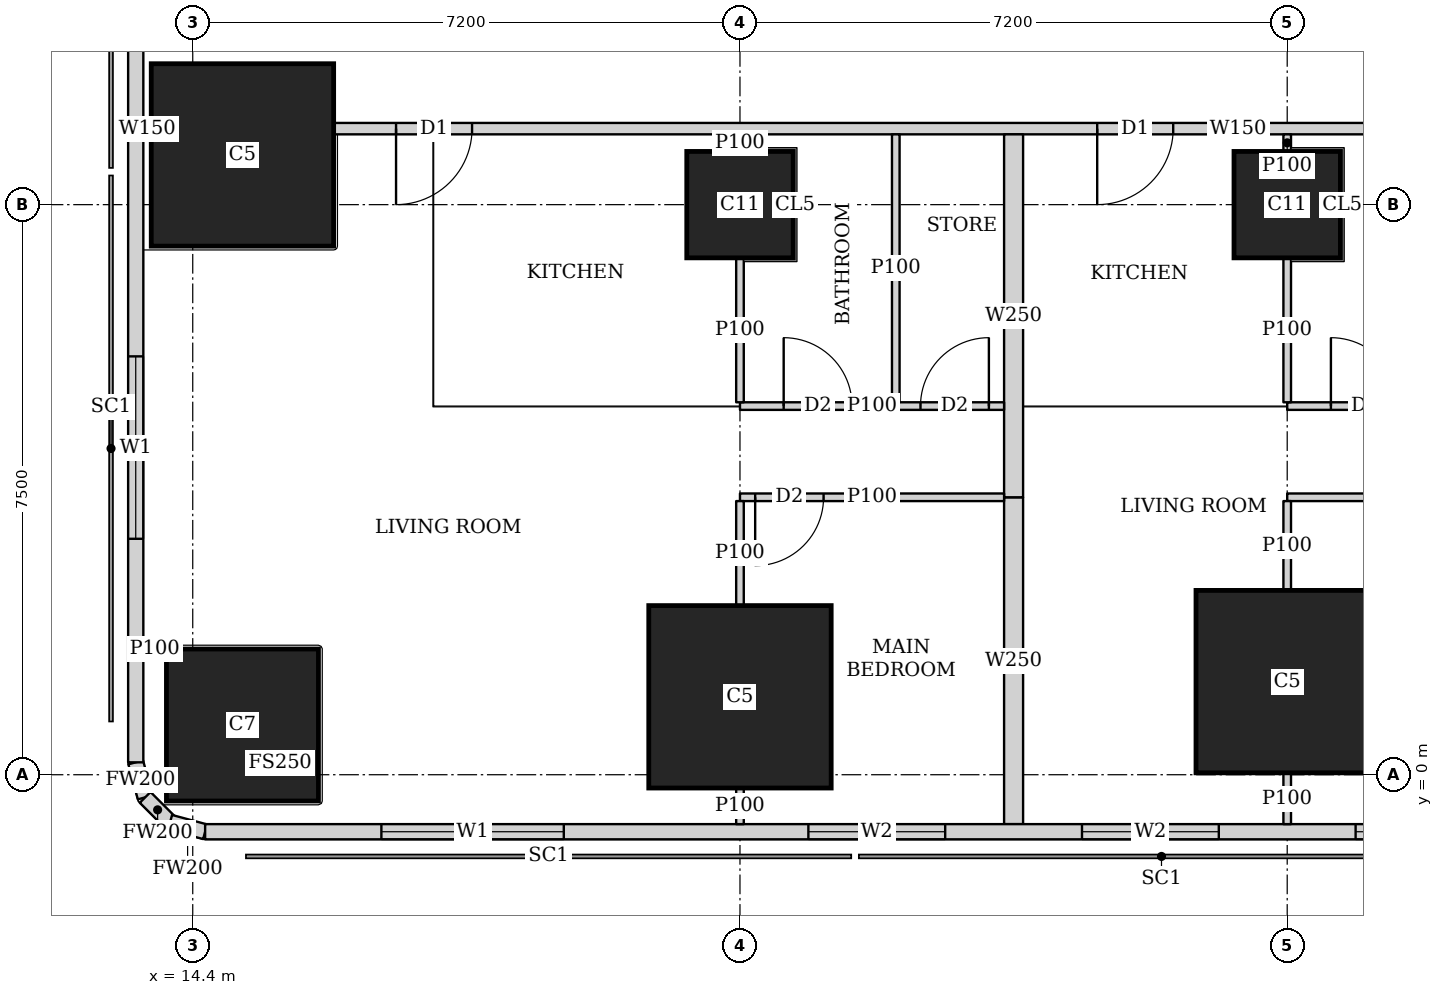
"""IFC4 building model, lengths in metres.
Left out: names, types, materials, properties, quantities, classifications, styles, units other than length and angle.
Written with IfcOpenShell. Run it as: python <this file> out.ifc"""

import sys

from ifc_helpers import new_model, si_unit, direction, frame, frame_2d, origin, origin_2d, place, context, subcontext, project, spatial, rectangle, extrude, element, fill, save


model = new_model("IFC4")
c1 = context("Model", 3, precision=1e-05, world=origin(), true_north=direction((0.0, 1.0)))
c2 = subcontext(c1, "Body", "Model", "MODEL_VIEW")
j1 = project(units=[si_unit("LENGTHUNIT", "METRE"), si_unit("PLANEANGLEUNIT", "RADIAN")], contexts=[c1])
p1 = place(None, origin())
s1 = spatial("IfcSite", under=j1, at=p1, CompositionType="ELEMENT")
p2 = place(p1, origin())
s2 = spatial("IfcBuilding", under=s1, at=p2, CompositionType="ELEMENT")
p3 = place(p2, frame((0.0, 0.0, 227.45)))
s3 = spatial("IfcBuildingStorey", under=s2, at=p3, CompositionType="ELEMENT", Elevation=227.45)
p4 = place(p3, frame((15.054, 0.654, 0.0), z_axis=(0.0, 0.0, 1.0), x_axis=(1.0, 0.0, 0.0)))
e1 = element("IfcColumn", 1, at=p4, inside=s3, PredefinedType="COLUMN", context=c2, shape_type="SweptSolid", body=[
    extrude(rectangle(XDim=2.0, YDim=2.0, at=origin_2d()), origin(), (0.0, 0.0, 1.0), 3.75),
])
for number, where, z_axis, x_axis in (
    (2, (21.6, 1.025, 0.0), (0.0, 0.0, 1.0), (1.0, 0.0, 0.0)),
    (3, (28.8, 1.225, 0.0), (0.0, 0.0, 1.0), (1.0, 0.0, 0.0)),
    (4, (15.054, 8.154, 0.0), (0.0, 0.0, 1.0), (1.0, 0.0, 0.0)),
):
    element("IfcColumn", number, at=place(p3, frame(where, z_axis=z_axis, x_axis=x_axis)), inside=s3, PredefinedType="COLUMN", context=c2, shape_type="SweptSolid", body=[
        extrude(rectangle(XDim=2.4, YDim=2.4, at=origin_2d()), origin(), (0.0, 0.0, 1.0), 3.75),
    ])
for number, where, z_axis, x_axis in (
    (5, (21.6, 7.5, 0.0), (0.0, 0.0, 1.0), (1.0, 0.0, 0.0)),
    (6, (28.8, 7.5, 0.0), (0.0, 0.0, 1.0), (1.0, 0.0, 0.0)),
):
    element("IfcColumn", number, at=place(p3, frame(where, z_axis=z_axis, x_axis=x_axis)), inside=s3, PredefinedType="COLUMN", context=c2, shape_type="SweptSolid", body=[
        extrude(rectangle(XDim=1.4, YDim=1.4, at=origin_2d()), origin(), (0.0, 0.0, 1.0), 3.75),
    ])
p5 = place(p3, frame((14.563, -0.75, 0.0), z_axis=(0.0, 0.0, 1.0), x_axis=(1.0, 0.0, 0.0)))
e7 = element("IfcWall", 7, at=p5, inside=s3, PredefinedType="SOLIDWALL", context=c2, shape_type="SweptSolid", body=[
    extrude(rectangle(XDim=33.228, YDim=0.2, at=frame_2d((16.614, 0.0))), origin(), (0.0, 0.0, 1.0), 3.5),
])
p6 = place(p5, frame((2.319, 0.0, 0.9)))
e8 = element("IfcOpeningElement", 8, at=p6, cuts=e7, PredefinedType="OPENING", context=c2, shape_type="SweptSolid", body=[
    extrude(rectangle(XDim=2.4, YDim=1.5, at=frame_2d((1.2, 0.75))), frame((0.0, 0.11, 0.0), z_axis=(0.0, -1.0, 0.0), x_axis=(1.0, 0.0, 0.0)), (0.0, 0.0, 1.0), 0.22),
])
p7 = place(p5, frame((7.937, 0.0, 0.9)))
e9 = element("IfcOpeningElement", 9, at=p7, cuts=e7, PredefinedType="OPENING", context=c2, shape_type="SweptSolid", body=[
    extrude(rectangle(XDim=1.8, YDim=1.5, at=frame_2d((0.9, 0.75))), frame((0.0, 0.11, 0.0), z_axis=(0.0, -1.0, 0.0), x_axis=(1.0, 0.0, 0.0)), (0.0, 0.0, 1.0), 0.22),
])
p8 = place(p5, frame((11.537, 0.0, 0.9)))
e10 = element("IfcOpeningElement", 10, at=p8, cuts=e7, PredefinedType="OPENING", context=c2, shape_type="SweptSolid", body=[
    extrude(rectangle(XDim=1.8, YDim=1.5, at=frame_2d((0.9, 0.75))), frame((0.0, 0.11, 0.0), z_axis=(0.0, -1.0, 0.0), x_axis=(1.0, 0.0, 0.0)), (0.0, 0.0, 1.0), 0.22),
])
p9 = place(p5, frame((15.137, 0.0, 0.9)))
e11 = element("IfcOpeningElement", 11, at=p9, cuts=e7, PredefinedType="OPENING", context=c2, shape_type="SweptSolid", body=[
    extrude(rectangle(XDim=1.8, YDim=1.5, at=frame_2d((0.9, 0.75))), frame((0.0, 0.11, 0.0), z_axis=(0.0, -1.0, 0.0), x_axis=(1.0, 0.0, 0.0)), (0.0, 0.0, 1.0), 0.22),
])
p10 = place(p5, frame((18.737, 0.0, 0.9)))
e12 = element("IfcOpeningElement", 12, at=p10, cuts=e7, PredefinedType="OPENING", context=c2, shape_type="SweptSolid", body=[
    extrude(rectangle(XDim=1.8, YDim=1.5, at=frame_2d((0.9, 0.75))), frame((0.0, 0.11, 0.0), z_axis=(0.0, -1.0, 0.0), x_axis=(1.0, 0.0, 0.0)), (0.0, 0.0, 1.0), 0.22),
])
p11 = place(p5, frame((22.337, 0.0, 0.9)))
e13 = element("IfcOpeningElement", 13, at=p11, cuts=e7, PredefinedType="OPENING", context=c2, shape_type="SweptSolid", body=[
    extrude(rectangle(XDim=1.8, YDim=1.5, at=frame_2d((0.9, 0.75))), frame((0.0, 0.11, 0.0), z_axis=(0.0, -1.0, 0.0), x_axis=(1.0, 0.0, 0.0)), (0.0, 0.0, 1.0), 0.22),
])
p12 = place(p3, frame((13.65, 44.837, 0.0), z_axis=(0.0, 0.0, 1.0), x_axis=(0.0, -1.0, 0.0)))
e14 = element("IfcWall", 14, at=p12, inside=s3, PredefinedType="SOLIDWALL", context=c2, shape_type="SweptSolid", body=[
    extrude(rectangle(XDim=44.674, YDim=0.2, at=frame_2d((22.337, 0.0))), origin(), (0.0, 0.0, 1.0), 3.5),
])
p13 = place(p12, frame((2.614, 0.0, 0.9)))
e15 = element("IfcOpeningElement", 15, at=p13, cuts=e14, PredefinedType="OPENING", context=c2, shape_type="SweptSolid", body=[
    extrude(rectangle(XDim=2.4, YDim=1.5, at=frame_2d((1.2, 0.75))), frame((0.0, 0.11, 0.0), z_axis=(0.0, -1.0, 0.0), x_axis=(1.0, 0.0, 0.0)), (0.0, 0.0, 1.0), 0.22),
])
p14 = place(p12, frame((39.333, 0.0, 0.9)))
e16 = element("IfcOpeningElement", 16, at=p14, cuts=e14, PredefinedType="OPENING", context=c2, shape_type="SweptSolid", body=[
    extrude(rectangle(XDim=2.4, YDim=1.5, at=frame_2d((1.2, 0.75))), frame((0.0, 0.11, 0.0), z_axis=(0.0, -1.0, 0.0), x_axis=(1.0, 0.0, 0.0)), (0.0, 0.0, 1.0), 0.22),
])
p15 = place(p3, frame((13.65, 0.163, 0.0), z_axis=(0.0, 0.0, 1.0), x_axis=(0.259698463175, -0.965689757751, 0.0)))
e17 = element("IfcWall", 17, at=p15, inside=s3, PredefinedType="SOLIDWALL", context=c2, shape_type="SweptSolid", body=[
    extrude(rectangle(XDim=0.478, YDim=0.2, at=frame_2d((0.239, 0.0))), origin(), (0.0, 0.0, 1.0), 3.5),
])
p16 = place(p3, frame((13.774, -0.298, 0.0), z_axis=(0.0, 0.0, 1.0), x_axis=(0.707369890659, -0.706843573776, 0.0)))
e18 = element("IfcWall", 18, at=p16, inside=s3, PredefinedType="SOLIDWALL", context=c2, shape_type="SweptSolid", body=[
    extrude(rectangle(XDim=0.464, YDim=0.2, at=frame_2d((0.232, 0.0))), origin(), (0.0, 0.0, 1.0), 3.5),
])
p17 = place(p3, frame((14.102, -0.626, 0.0), z_axis=(0.0, 0.0, 1.0), x_axis=(0.965655254015, -0.259826731483, 0.0)))
e19 = element("IfcWall", 19, at=p17, inside=s3, PredefinedType="SOLIDWALL", context=c2, shape_type="SweptSolid", body=[
    extrude(rectangle(XDim=0.477, YDim=0.2, at=frame_2d((0.239, 0.0))), origin(), (0.0, 0.0, 1.0), 3.5),
])
p18 = place(p3, frame((40.053, 8.5, 0.0), z_axis=(0.0, 0.0, 1.0), x_axis=(-1.0, 0.0, 0.0)))
e20 = element("IfcWall", 20, at=p18, inside=s3, PredefinedType="SOLIDWALL", context=c2, shape_type="SweptSolid", body=[
    extrude(rectangle(XDim=23.798, YDim=0.15, at=frame_2d((11.899, 0.0))), origin(), (0.0, 0.0, 1.0), 3.5),
])
p19 = place(p18, frame((21.978, 0.0, 0.0)))
e21 = element("IfcOpeningElement", 21, at=p19, cuts=e20, PredefinedType="OPENING", context=c2, shape_type="SweptSolid", body=[
    extrude(rectangle(XDim=1.0, YDim=2.1, at=frame_2d((0.5, 1.05))), frame((0.0, 0.085, 0.0), z_axis=(0.0, -1.0, 0.0), x_axis=(1.0, 0.0, 0.0)), (0.0, 0.0, 1.0), 0.17),
])
p20 = place(p18, frame((12.753, 0.0, 0.0)))
e22 = element("IfcOpeningElement", 22, at=p20, cuts=e20, PredefinedType="OPENING", context=c2, shape_type="SweptSolid", body=[
    extrude(rectangle(XDim=1.0, YDim=2.1, at=frame_2d((0.5, 1.05))), frame((0.0, 0.085, 0.0), z_axis=(0.0, -1.0, 0.0), x_axis=(1.0, 0.0, 0.0)), (0.0, 0.0, 1.0), 0.17),
])
p21 = place(p18, frame((0.15, 0.0, 0.0)))
e23 = element("IfcOpeningElement", 23, at=p21, cuts=e20, PredefinedType="OPENING", context=c2, shape_type="SweptSolid", body=[
    extrude(rectangle(XDim=1.0, YDim=2.1, at=frame_2d((0.5, 1.05))), frame((0.0, 0.085, 0.0), z_axis=(0.0, -1.0, 0.0), x_axis=(1.0, 0.0, 0.0)), (0.0, 0.0, 1.0), 0.17),
])
p22 = place(p3, frame((13.853, 8.5, 0.0), z_axis=(0.0, 0.0, 1.0), x_axis=(-1.0, 0.0, 0.0)))
e24 = element("IfcWall", 24, at=p22, inside=s3, PredefinedType="SOLIDWALL", context=c2, shape_type="SweptSolid", body=[
    extrude(rectangle(XDim=0.103, YDim=0.15, at=frame_2d((0.052, 0.0))), origin(), (0.0, 0.0, 1.0), 3.5),
])
p23 = place(p3, frame((13.75, 1.654, 0.0), z_axis=(0.0, 0.0, 1.0), x_axis=(1.0, 0.0, 0.0)))
e25 = element("IfcWall", 25, at=p23, inside=s3, PredefinedType="PARTITIONING", context=c2, shape_type="SweptSolid", body=[
    extrude(rectangle(XDim=0.304, YDim=0.1, at=frame_2d((0.152, 0.0))), origin(), (0.0, 0.0, 1.0), 2.05),
])
p24 = place(p3, frame((25.075, 3.65, 0.0), z_axis=(0.0, 0.0, 1.0), x_axis=(-1.0, 0.0, 0.0)))
e26 = element("IfcWall", 26, at=p24, inside=s3, PredefinedType="PARTITIONING", context=c2, shape_type="SweptSolid", body=[
    extrude(rectangle(XDim=3.475, YDim=0.1, at=frame_2d((1.737, 0.0))), origin(), (0.0, 0.0, 1.0), 3.5),
])
p25 = place(p24, frame((2.375, 0.0, 0.0)))
e27 = element("IfcOpeningElement", 27, at=p25, cuts=e26, PredefinedType="OPENING", context=c2, shape_type="SweptSolid", body=[
    extrude(rectangle(XDim=0.9, YDim=2.1, at=frame_2d((0.45, 1.05))), frame((0.0, 0.06, 0.0), z_axis=(0.0, -1.0, 0.0), x_axis=(1.0, 0.0, 0.0)), (0.0, 0.0, 1.0), 0.12),
])
p26 = place(p3, frame((25.075, 4.85, 0.0), z_axis=(0.0, 0.0, 1.0), x_axis=(-1.0, 0.0, 0.0)))
e28 = element("IfcWall", 28, at=p26, inside=s3, PredefinedType="PARTITIONING", context=c2, shape_type="SweptSolid", body=[
    extrude(rectangle(XDim=3.475, YDim=0.1, at=frame_2d((1.737, 0.0))), origin(), (0.0, 0.0, 1.0), 3.5),
])
p27 = place(p26, frame((2.0, 0.0, 0.0)))
e29 = element("IfcOpeningElement", 29, at=p27, cuts=e28, PredefinedType="OPENING", context=c2, shape_type="SweptSolid", body=[
    extrude(rectangle(XDim=0.9, YDim=2.1, at=frame_2d((0.45, 1.05))), frame((0.0, 0.06, 0.0), z_axis=(0.0, -1.0, 0.0), x_axis=(1.0, 0.0, 0.0)), (0.0, 0.0, 1.0), 0.12),
])
p28 = place(p26, frame((0.2, 0.0, 0.0)))
e30 = element("IfcOpeningElement", 30, at=p28, cuts=e28, PredefinedType="OPENING", context=c2, shape_type="SweptSolid", body=[
    extrude(rectangle(XDim=0.9, YDim=2.1, at=frame_2d((0.45, 1.05))), frame((0.0, 0.06, 0.0), z_axis=(0.0, -1.0, 0.0), x_axis=(1.0, 0.0, 0.0)), (0.0, 0.0, 1.0), 0.12),
])
p29 = place(p3, frame((21.6, -0.65, 0.0), z_axis=(0.0, 0.0, 1.0), x_axis=(0.0, 1.0, 0.0)))
e31 = element("IfcWall", 31, at=p29, inside=s3, PredefinedType="PARTITIONING", context=c2, shape_type="SweptSolid", body=[
    extrude(rectangle(XDim=0.474, YDim=0.1, at=frame_2d((0.237, 0.0))), origin(), (0.0, 0.0, 1.0), 3.5),
])
p30 = place(p3, frame((21.6, 2.226, 0.0), z_axis=(0.0, 0.0, 1.0), x_axis=(0.0, 1.0, 0.0)))
e32 = element("IfcWall", 32, at=p30, inside=s3, PredefinedType="PARTITIONING", context=c2, shape_type="SweptSolid", body=[
    extrude(rectangle(XDim=1.374, YDim=0.1, at=frame_2d((0.687, 0.0))), origin(), (0.0, 0.0, 1.0), 3.5),
])
p31 = place(p3, frame((21.6, 4.9, 0.0), z_axis=(0.0, 0.0, 1.0), x_axis=(0.0, 1.0, 0.0)))
e33 = element("IfcWall", 33, at=p31, inside=s3, PredefinedType="PARTITIONING", context=c2, shape_type="SweptSolid", body=[
    extrude(rectangle(XDim=1.899, YDim=0.1, at=frame_2d((0.95, 0.0))), origin(), (0.0, 0.0, 1.0), 3.5),
])
p32 = place(p3, frame((21.6, 8.201, 0.0), z_axis=(0.0, 0.0, 1.0), x_axis=(0.0, 1.0, 0.0)))
e34 = element("IfcWall", 34, at=p32, inside=s3, PredefinedType="PARTITIONING", context=c2, shape_type="SweptSolid", body=[
    extrude(rectangle(XDim=0.224, YDim=0.1, at=frame_2d((0.112, 0.0))), origin(), (0.0, 0.0, 1.0), 3.5),
])
p33 = place(p3, frame((23.65, 4.9, 0.0), z_axis=(0.0, 0.0, 1.0), x_axis=(0.0, 1.0, 0.0)))
e35 = element("IfcWall", 35, at=p33, inside=s3, PredefinedType="PARTITIONING", context=c2, shape_type="SweptSolid", body=[
    extrude(rectangle(XDim=3.525, YDim=0.1, at=frame_2d((1.763, 0.0))), origin(), (0.0, 0.0, 1.0), 3.5),
])
p34 = place(p3, frame((35.875, 3.65, 0.0), z_axis=(0.0, 0.0, 1.0), x_axis=(-1.0, 0.0, 0.0)))
e36 = element("IfcWall", 36, at=p34, inside=s3, PredefinedType="PARTITIONING", context=c2, shape_type="SweptSolid", body=[
    extrude(rectangle(XDim=7.075, YDim=0.1, at=frame_2d((3.538, 0.0))), origin(), (0.0, 0.0, 1.0), 3.5),
])
p35 = place(p34, frame((4.95, 0.0, 0.0)))
e37 = element("IfcOpeningElement", 37, at=p35, cuts=e36, PredefinedType="OPENING", context=c2, shape_type="SweptSolid", body=[
    extrude(rectangle(XDim=0.9, YDim=2.1, at=frame_2d((0.45, 1.05))), frame((0.0, 0.06, 0.0), z_axis=(0.0, -1.0, 0.0), x_axis=(1.0, 0.0, 0.0)), (0.0, 0.0, 1.0), 0.12),
])
p36 = place(p34, frame((2.375, 0.0, 0.0)))
e38 = element("IfcOpeningElement", 38, at=p36, cuts=e36, PredefinedType="OPENING", context=c2, shape_type="SweptSolid", body=[
    extrude(rectangle(XDim=0.9, YDim=2.1, at=frame_2d((0.45, 1.05))), frame((0.0, 0.06, 0.0), z_axis=(0.0, -1.0, 0.0), x_axis=(1.0, 0.0, 0.0)), (0.0, 0.0, 1.0), 0.12),
])
p37 = place(p3, frame((35.875, 4.85, 0.0), z_axis=(0.0, 0.0, 1.0), x_axis=(-1.0, 0.0, 0.0)))
e39 = element("IfcWall", 39, at=p37, inside=s3, PredefinedType="PARTITIONING", context=c2, shape_type="SweptSolid", body=[
    extrude(rectangle(XDim=7.075, YDim=0.1, at=frame_2d((3.538, 0.0))), origin(), (0.0, 0.0, 1.0), 3.5),
])
p38 = place(p37, frame((5.6, 0.0, 0.0)))
e40 = element("IfcOpeningElement", 40, at=p38, cuts=e39, PredefinedType="OPENING", context=c2, shape_type="SweptSolid", body=[
    extrude(rectangle(XDim=0.9, YDim=2.1, at=frame_2d((0.45, 1.05))), frame((0.0, 0.06, 0.0), z_axis=(0.0, -1.0, 0.0), x_axis=(1.0, 0.0, 0.0)), (0.0, 0.0, 1.0), 0.12),
])
p39 = place(p37, frame((2.225, 0.0, 0.0)))
e41 = element("IfcOpeningElement", 41, at=p39, cuts=e39, PredefinedType="OPENING", context=c2, shape_type="SweptSolid", body=[
    extrude(rectangle(XDim=0.9, YDim=2.1, at=frame_2d((0.45, 1.05))), frame((0.0, 0.06, 0.0), z_axis=(0.0, -1.0, 0.0), x_axis=(1.0, 0.0, 0.0)), (0.0, 0.0, 1.0), 0.12),
])
p40 = place(p37, frame((3.8, 0.0, 0.0)))
e42 = element("IfcOpeningElement", 42, at=p40, cuts=e39, PredefinedType="OPENING", context=c2, shape_type="SweptSolid", body=[
    extrude(rectangle(XDim=0.9, YDim=2.1, at=frame_2d((0.45, 1.05))), frame((0.0, 0.06, 0.0), z_axis=(0.0, -1.0, 0.0), x_axis=(1.0, 0.0, 0.0)), (0.0, 0.0, 1.0), 0.12),
])
p41 = place(p37, frame((0.425, 0.0, 0.0)))
e43 = element("IfcOpeningElement", 43, at=p41, cuts=e39, PredefinedType="OPENING", context=c2, shape_type="SweptSolid", body=[
    extrude(rectangle(XDim=0.9, YDim=2.1, at=frame_2d((0.45, 1.05))), frame((0.0, 0.06, 0.0), z_axis=(0.0, -1.0, 0.0), x_axis=(1.0, 0.0, 0.0)), (0.0, 0.0, 1.0), 0.12),
])
p42 = place(p3, frame((28.8, -0.65, 0.0), z_axis=(0.0, 0.0, 1.0), x_axis=(0.0, 1.0, 0.0)))
e44 = element("IfcWall", 44, at=p42, inside=s3, PredefinedType="PARTITIONING", context=c2, shape_type="SweptSolid", body=[
    extrude(rectangle(XDim=0.674, YDim=0.1, at=frame_2d((0.337, 0.0))), origin(), (0.0, 0.0, 1.0), 3.5),
])
p43 = place(p3, frame((28.8, 2.426, 0.0), z_axis=(0.0, 0.0, 1.0), x_axis=(0.0, 1.0, 0.0)))
e45 = element("IfcWall", 45, at=p43, inside=s3, PredefinedType="PARTITIONING", context=c2, shape_type="SweptSolid", body=[
    extrude(rectangle(XDim=1.174, YDim=0.1, at=frame_2d((0.587, 0.0))), origin(), (0.0, 0.0, 1.0), 3.5),
])
p44 = place(p3, frame((28.8, 4.9, 0.0), z_axis=(0.0, 0.0, 1.0), x_axis=(0.0, 1.0, 0.0)))
e46 = element("IfcWall", 46, at=p44, inside=s3, PredefinedType="PARTITIONING", context=c2, shape_type="SweptSolid", body=[
    extrude(rectangle(XDim=1.899, YDim=0.1, at=frame_2d((0.95, 0.0))), origin(), (0.0, 0.0, 1.0), 3.5),
])
p45 = place(p3, frame((28.8, 8.201, 0.0), z_axis=(0.0, 0.0, 1.0), x_axis=(0.0, 1.0, 0.0)))
e47 = element("IfcWall", 47, at=p45, inside=s3, PredefinedType="PARTITIONING", context=c2, shape_type="SweptSolid", body=[
    extrude(rectangle(XDim=0.224, YDim=0.1, at=frame_2d((0.112, 0.0))), origin(), (0.0, 0.0, 1.0), 3.5),
])
p46 = place(p3, frame((25.2, -0.65, 0.0), z_axis=(0.0, 0.0, 1.0), x_axis=(0.0, 1.0, 0.0)))
e48 = element("IfcWall", 48, at=p46, inside=s3, PredefinedType="SOLIDWALL", context=c2, shape_type="SweptSolid", body=[
    extrude(rectangle(XDim=4.3, YDim=0.25, at=frame_2d((2.15, 0.0))), origin(), (0.0, 0.0, 1.0), 2.05),
])
p47 = place(p3, frame((25.2, 3.65, 0.0), z_axis=(0.0, 0.0, 1.0), x_axis=(0.0, 1.0, 0.0)))
e49 = element("IfcWall", 49, at=p47, inside=s3, PredefinedType="SOLIDWALL", context=c2, shape_type="SweptSolid", body=[
    extrude(rectangle(XDim=4.775, YDim=0.25, at=frame_2d((2.388, 0.0))), origin(), (0.0, 0.0, 1.0), 3.5),
])
p48 = place(p6, origin())
e50 = element("IfcWindow", 50, at=p48, inside=s3, PartitioningType="SINGLE_PANEL", PredefinedType="WINDOW", context=c2, shape_type="SweptSolid", body=[
    extrude(rectangle(XDim=2.4, YDim=1.5, at=frame_2d((1.2, 0.75))), frame((0.0, 0.03, 0.0), z_axis=(0.0, -1.0, 0.0), x_axis=(1.0, 0.0, 0.0)), (0.0, 0.0, 1.0), 0.06),
])
fill(e8, e50)
p49 = place(p7, origin())
e51 = element("IfcWindow", 51, at=p49, inside=s3, PartitioningType="SINGLE_PANEL", PredefinedType="WINDOW", context=c2, shape_type="SweptSolid", body=[
    extrude(rectangle(XDim=1.8, YDim=1.5, at=frame_2d((0.9, 0.75))), frame((0.0, 0.03, 0.0), z_axis=(0.0, -1.0, 0.0), x_axis=(1.0, 0.0, 0.0)), (0.0, 0.0, 1.0), 0.06),
])
fill(e9, e51)
p50 = place(p8, origin())
e52 = element("IfcWindow", 52, at=p50, inside=s3, PartitioningType="SINGLE_PANEL", PredefinedType="WINDOW", context=c2, shape_type="SweptSolid", body=[
    extrude(rectangle(XDim=1.8, YDim=1.5, at=frame_2d((0.9, 0.75))), frame((0.0, 0.03, 0.0), z_axis=(0.0, -1.0, 0.0), x_axis=(1.0, 0.0, 0.0)), (0.0, 0.0, 1.0), 0.06),
])
fill(e10, e52)
p51 = place(p9, origin())
e53 = element("IfcWindow", 53, at=p51, inside=s3, PartitioningType="SINGLE_PANEL", PredefinedType="WINDOW", context=c2, shape_type="SweptSolid", body=[
    extrude(rectangle(XDim=1.8, YDim=1.5, at=frame_2d((0.9, 0.75))), frame((0.0, 0.03, 0.0), z_axis=(0.0, -1.0, 0.0), x_axis=(1.0, 0.0, 0.0)), (0.0, 0.0, 1.0), 0.06),
])
fill(e11, e53)
p52 = place(p14, origin())
e54 = element("IfcWindow", 54, at=p52, inside=s3, PartitioningType="SINGLE_PANEL", PredefinedType="WINDOW", context=c2, shape_type="SweptSolid", body=[
    extrude(rectangle(XDim=2.4, YDim=1.5, at=frame_2d((1.2, 0.75))), frame((0.0, 0.03, 0.0), z_axis=(0.0, -1.0, 0.0), x_axis=(1.0, 0.0, 0.0)), (0.0, 0.0, 1.0), 0.06),
])
fill(e16, e54)
p53 = place(p25, origin())
e55 = element("IfcDoor", 55, at=p53, inside=s3, OperationType="SINGLE_SWING_RIGHT", PredefinedType="DOOR", context=c2, shape_type="SweptSolid", body=[
    extrude(rectangle(XDim=0.9, YDim=2.1, at=frame_2d((0.45, 1.05))), frame((0.0, 0.025, 0.0), z_axis=(0.0, -1.0, 0.0), x_axis=(1.0, 0.0, 0.0)), (0.0, 0.0, 1.0), 0.05),
])
fill(e27, e55)
p54 = place(p27, origin())
e56 = element("IfcDoor", 56, at=p54, inside=s3, OperationType="SINGLE_SWING_LEFT", PredefinedType="DOOR", context=c2, shape_type="SweptSolid", body=[
    extrude(rectangle(XDim=0.9, YDim=2.1, at=frame_2d((0.45, 1.05))), frame((0.0, 0.025, 0.0), z_axis=(0.0, -1.0, 0.0), x_axis=(1.0, 0.0, 0.0)), (0.0, 0.0, 1.0), 0.05),
])
fill(e29, e56)
p55 = place(p28, origin())
e57 = element("IfcDoor", 57, at=p55, inside=s3, OperationType="SINGLE_SWING_RIGHT", PredefinedType="DOOR", context=c2, shape_type="SweptSolid", body=[
    extrude(rectangle(XDim=0.9, YDim=2.1, at=frame_2d((0.45, 1.05))), frame((0.0, 0.025, 0.0), z_axis=(0.0, -1.0, 0.0), x_axis=(1.0, 0.0, 0.0)), (0.0, 0.0, 1.0), 0.05),
])
fill(e30, e57)
p56 = place(p19, origin())
e58 = element("IfcDoor", 58, at=p56, inside=s3, OperationType="SINGLE_SWING_RIGHT", PredefinedType="DOOR", context=c2, shape_type="SweptSolid", body=[
    extrude(rectangle(XDim=1.0, YDim=2.1, at=frame_2d((0.5, 1.05))), frame((0.0, 0.025, 0.0), z_axis=(0.0, -1.0, 0.0), x_axis=(1.0, 0.0, 0.0)), (0.0, 0.0, 1.0), 0.05),
])
fill(e21, e58)
p57 = place(p38, origin())
e59 = element("IfcDoor", 59, at=p57, inside=s3, OperationType="SINGLE_SWING_LEFT", PredefinedType="DOOR", context=c2, shape_type="SweptSolid", body=[
    extrude(rectangle(XDim=0.9, YDim=2.1, at=frame_2d((0.45, 1.05))), frame((0.0, 0.025, 0.0), z_axis=(0.0, -1.0, 0.0), x_axis=(1.0, 0.0, 0.0)), (0.0, 0.0, 1.0), 0.05),
])
fill(e40, e59)
p58 = place(p20, origin())
e60 = element("IfcDoor", 60, at=p58, inside=s3, OperationType="SINGLE_SWING_RIGHT", PredefinedType="DOOR", context=c2, shape_type="SweptSolid", body=[
    extrude(rectangle(XDim=1.0, YDim=2.1, at=frame_2d((0.5, 1.05))), frame((0.0, 0.025, 0.0), z_axis=(0.0, -1.0, 0.0), x_axis=(1.0, 0.0, 0.0)), (0.0, 0.0, 1.0), 0.05),
])
fill(e22, e60)
save(model, sys.argv[1])
